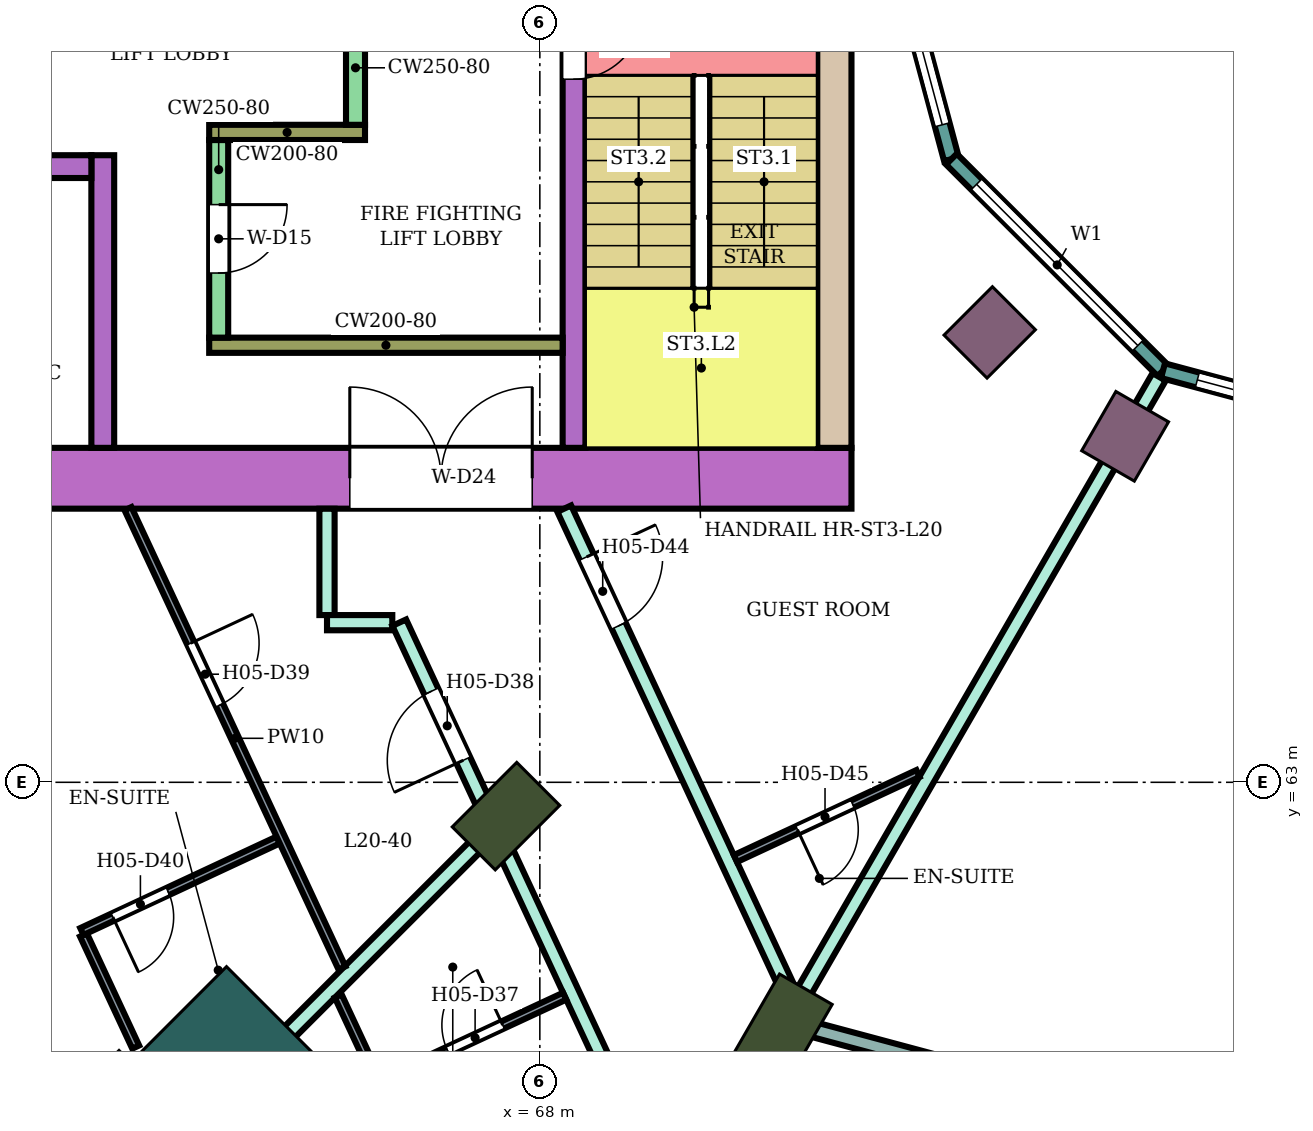
"""IFC4 building model, lengths in metres.
Left out: names, types, materials, properties, quantities, classifications, styles, units other than length and angle.
Written with IfcOpenShell. Run it as: python <this file> out.ifc"""

import sys

from ifc_helpers import new_model, si_unit, direction, frame, frame_2d, origin, origin_2d, place, context, subcontext, project, spatial, rectangle, extrude, element, fill, save


model = new_model("IFC4")
c1 = context("Model", 3, precision=1e-05, world=origin(), true_north=direction((0.0, 1.0)))
c2 = subcontext(c1, "Body", "Model", "MODEL_VIEW")
j1 = project(units=[si_unit("LENGTHUNIT", "METRE"), si_unit("PLANEANGLEUNIT", "RADIAN")], contexts=[c1])
p1 = place(None, origin())
s1 = spatial("IfcSite", under=j1, at=p1, CompositionType="ELEMENT")
p2 = place(p1, origin())
s2 = spatial("IfcBuilding", under=s1, at=p2, CompositionType="ELEMENT")
p3 = place(p2, frame((0.0, 0.0, 90.0)))
s3 = spatial("IfcBuildingStorey", under=s2, at=p3, CompositionType="ELEMENT", Elevation=90.0)
for number, where, z_axis, x_axis in (
    (1, (67.555, 62.555, 0.0), (0.0, 0.0, 1.0), (-0.707, -0.707, 0.0)),
    (2, (71.2, 59.758, 0.0), (0.0, 0.0, 1.0), (-0.5, -0.866, 0.0)),
):
    element("IfcColumn", number, at=place(p3, frame(where, z_axis=z_axis, x_axis=x_axis)), inside=s3, PredefinedType="COLUMN", context=c2, shape_type="SweptSolid", body=[
        extrude(rectangle(XDim=1.2, YDim=0.8, at=origin_2d()), origin(), (0.0, 0.0, 1.0), 3.8),
    ])
for number, where, z_axis, x_axis in (
    (3, (73.919, 68.919, 0.0), (0.0, 0.0, 1.0), (-0.707, -0.707, 0.0)),
    (4, (75.7, 67.552, 0.0), (0.0, 0.0, 1.0), (-0.5, -0.866, 0.0)),
):
    element("IfcColumn", number, at=place(p3, frame(where, z_axis=z_axis, x_axis=x_axis)), inside=s3, PredefinedType="COLUMN", context=c2, shape_type="SweptSolid", body=[
        extrude(rectangle(XDim=0.9, YDim=0.8, at=origin_2d()), origin(), (0.0, 0.0, 1.0), 3.8),
    ])
p4 = place(p3, frame((64.09, 59.09, 0.0), z_axis=(0.0, 0.0, 1.0), x_axis=(-0.707106781187, -0.707106781187, 0.0)))
e5 = element("IfcColumn", 5, at=p4, inside=s3, PredefinedType="COLUMN", context=c2, shape_type="SweptSolid", body=[
    extrude(rectangle(XDim=1.8, YDim=2.4, at=origin_2d()), origin(), (0.0, 0.0, 1.0), 3.8),
])
p5 = place(p3, frame((72.1, 67.0, 0.0), z_axis=(0.0, 0.0, 1.0), x_axis=(-1.0, 0.0, 0.0)))
e6 = element("IfcWall", 6, at=p5, inside=s3, PredefinedType="SHEAR", context=c2, shape_type="SweptSolid", body=[
    extrude(rectangle(XDim=14.7, YDim=0.8, at=frame_2d((7.35, 0.0))), origin(), (0.0, 0.0, 1.0), 3.48),
])
p6 = place(p5, frame((4.2, 0.0, 0.0)))
e7 = element("IfcOpeningElement", 7, at=p6, cuts=e6, PredefinedType="OPENING", context=c2, shape_type="SweptSolid", body=[
    extrude(rectangle(XDim=2.4, YDim=2.4, at=frame_2d((1.2, 1.2))), frame((0.0, 0.41, 0.0), z_axis=(0.0, -1.0, 0.0), x_axis=(1.0, 0.0, 0.0)), (0.0, 0.0, 1.0), 0.82),
])
p7 = place(p3, frame((71.875, 75.0, 0.0), z_axis=(0.0, 0.0, 1.0), x_axis=(0.0, -1.0, 0.0)))
e8 = element("IfcWall", 8, at=p7, inside=s3, PredefinedType="SHEAR", context=c2, shape_type="SweptSolid", body=[
    extrude(rectangle(XDim=7.6, YDim=0.45, at=frame_2d((3.8, 0.0))), origin(), (0.0, 0.0, 1.0), 3.48),
])
p8 = place(p3, frame((68.45, 75.0, 0.0), z_axis=(0.0, 0.0, 1.0), x_axis=(0.0, -1.0, 0.0)))
e9 = element("IfcWall", 9, at=p8, inside=s3, PredefinedType="SHEAR", context=c2, shape_type="SweptSolid", body=[
    extrude(rectangle(XDim=7.6, YDim=0.3, at=frame_2d((3.8, 0.0))), origin(), (0.0, 0.0, 1.0), 3.48),
])
p9 = place(p8, frame((1.85, 0.0, 0.0)))
e10 = element("IfcOpeningElement", 10, at=p9, cuts=e9, PredefinedType="OPENING", context=c2, shape_type="SweptSolid", body=[
    extrude(rectangle(XDim=0.9, YDim=2.1, at=frame_2d((0.45, 1.05))), frame((0.0, 0.16, 0.0), z_axis=(0.0, -1.0, 0.0), x_axis=(1.0, 0.0, 0.0)), (0.0, 0.0, 1.0), 0.32),
])
p10 = place(p3, frame((68.3, 68.75, 0.0), z_axis=(0.0, 0.0, 1.0), x_axis=(-1.0, 0.0, 0.0)))
e11 = element("IfcWall", 11, at=p10, inside=s3, PredefinedType="SHEAR", context=c2, shape_type="SweptSolid", body=[
    extrude(rectangle(XDim=4.65, YDim=0.2, at=frame_2d((2.325, 0.0))), origin(), (0.0, 0.0, 1.0), 3.48),
])
p11 = place(p3, frame((63.775, 71.45, 0.0), z_axis=(0.0, 0.0, 1.0), x_axis=(0.0, -1.0, 0.0)))
e12 = element("IfcWall", 12, at=p11, inside=s3, PredefinedType="SHEAR", context=c2, shape_type="SweptSolid", body=[
    extrude(rectangle(XDim=2.6, YDim=0.25, at=frame_2d((1.3, 0.0))), origin(), (0.0, 0.0, 1.0), 3.48),
])
p12 = place(p11, frame((0.85, 0.0, 0.0)))
e13 = element("IfcOpeningElement", 13, at=p12, cuts=e12, PredefinedType="OPENING", context=c2, shape_type="SweptSolid", body=[
    extrude(rectangle(XDim=0.9, YDim=2.1, at=frame_2d((0.45, 1.05))), frame((0.0, 0.135, 0.0), z_axis=(0.0, -1.0, 0.0), x_axis=(1.0, 0.0, 0.0)), (0.0, 0.0, 1.0), 0.27),
])
p13 = place(p3, frame((65.7, 71.55, 0.0), z_axis=(0.0, 0.0, 1.0), x_axis=(-1.0, 0.0, 0.0)))
e14 = element("IfcWall", 14, at=p13, inside=s3, PredefinedType="SHEAR", context=c2, shape_type="SweptSolid", body=[
    extrude(rectangle(XDim=2.05, YDim=0.2, at=frame_2d((1.025, 0.0))), origin(), (0.0, 0.0, 1.0), 3.48),
])
p14 = place(p3, frame((65.575, 73.15, 0.0), z_axis=(0.0, 0.0, 1.0), x_axis=(0.0, -1.0, 0.0)))
e15 = element("IfcWall", 15, at=p14, inside=s3, PredefinedType="SHEAR", context=c2, shape_type="SweptSolid", body=[
    extrude(rectangle(XDim=1.5, YDim=0.25, at=frame_2d((0.75, 0.0))), origin(), (0.0, 0.0, 1.0), 3.48),
])
p15 = place(p3, frame((62.25, 71.25, 0.0), z_axis=(0.0, 0.0, 1.0), x_axis=(0.0, -1.0, 0.0)))
e16 = element("IfcWall", 16, at=p15, inside=s3, PredefinedType="SHEAR", context=c2, shape_type="SweptSolid", body=[
    extrude(rectangle(XDim=3.85, YDim=0.3, at=frame_2d((1.925, 0.0))), origin(), (0.0, 0.0, 1.0), 3.48),
])
p16 = place(p3, frame((62.1, 71.1, 0.0), z_axis=(0.0, 0.0, 1.0), x_axis=(-1.0, 0.0, 0.0)))
e17 = element("IfcWall", 17, at=p16, inside=s3, PredefinedType="SHEAR", context=c2, shape_type="SweptSolid", body=[
    extrude(rectangle(XDim=4.7, YDim=0.3, at=frame_2d((2.35, 0.0))), origin(), (0.0, 0.0, 1.0), 3.48),
])
p17 = place(p16, frame((0.725, 0.0, 0.0)))
e18 = element("IfcOpeningElement", 18, at=p17, cuts=e17, PredefinedType="OPENING", context=c2, shape_type="SweptSolid", body=[
    extrude(rectangle(XDim=0.9, YDim=2.1, at=frame_2d((0.45, 1.05))), frame((0.0, 0.16, 0.0), z_axis=(0.0, -1.0, 0.0), x_axis=(1.0, 0.0, 0.0)), (0.0, 0.0, 1.0), 0.32),
])
p18 = place(p16, frame((3.075, 0.0, 0.0)))
e19 = element("IfcOpeningElement", 19, at=p18, cuts=e17, PredefinedType="OPENING", context=c2, shape_type="SweptSolid", body=[
    extrude(rectangle(XDim=0.9, YDim=2.1, at=frame_2d((0.45, 1.05))), frame((0.0, 0.16, 0.0), z_axis=(0.0, -1.0, 0.0), x_axis=(1.0, 0.0, 0.0)), (0.0, 0.0, 1.0), 0.32),
])
p19 = place(p3, frame((72.396, 75.0, 0.0), z_axis=(0.0, 0.0, 1.0), x_axis=(0.258789828301, -0.965933654434, 0.0)))
e20 = element("IfcWall", 20, at=p19, inside=s3, PredefinedType="NOTDEFINED", context=c2, shape_type="SweptSolid", body=[
    extrude(rectangle(XDim=3.936, YDim=0.2, at=frame_2d((1.968, 0.0))), origin(), (0.0, 0.0, 1.0), 3.8),
])
p20 = place(p19, frame((0.468, 0.0, 0.9)))
e21 = element("IfcOpeningElement", 21, at=p20, cuts=e20, PredefinedType="OPENING", context=c2, shape_type="SweptSolid", body=[
    extrude(rectangle(XDim=3.0, YDim=2.3, at=frame_2d((1.5, 1.15))), frame((0.0, 0.11, 0.0), z_axis=(0.0, -1.0, 0.0), x_axis=(1.0, 0.0, 0.0)), (0.0, 0.0, 1.0), 0.22),
])
p21 = place(p3, frame((73.415, 71.198, 0.0), z_axis=(0.0, 0.0, 1.0), x_axis=(0.707106781187, -0.707106781187, 0.0)))
e22 = element("IfcWall", 22, at=p21, inside=s3, PredefinedType="NOTDEFINED", context=c2, shape_type="SweptSolid", body=[
    extrude(rectangle(XDim=3.936, YDim=0.2, at=frame_2d((1.968, 0.0))), origin(), (0.0, 0.0, 1.0), 3.8),
])
p22 = place(p21, frame((0.468, 0.0, 0.9)))
e23 = element("IfcOpeningElement", 23, at=p22, cuts=e22, PredefinedType="OPENING", context=c2, shape_type="SweptSolid", body=[
    extrude(rectangle(XDim=3.0, YDim=2.3, at=frame_2d((1.5, 1.15))), frame((0.0, 0.11, 0.0), z_axis=(0.0, -1.0, 0.0), x_axis=(1.0, 0.0, 0.0)), (0.0, 0.0, 1.0), 0.22),
])
p23 = place(p3, frame((76.198, 68.415, 0.0), z_axis=(0.0, 0.0, 1.0), x_axis=(0.965933654434, -0.258789828301, 0.0)))
e24 = element("IfcWall", 24, at=p23, inside=s3, PredefinedType="NOTDEFINED", context=c2, shape_type="SweptSolid", body=[
    extrude(rectangle(XDim=3.936, YDim=0.2, at=frame_2d((1.968, 0.0))), origin(), (0.0, 0.0, 1.0), 3.8),
])
p24 = place(p23, frame((0.468, 0.0, 0.9)))
e25 = element("IfcOpeningElement", 25, at=p24, cuts=e24, PredefinedType="OPENING", context=c2, shape_type="SweptSolid", body=[
    extrude(rectangle(XDim=3.0, YDim=2.3, at=frame_2d((1.5, 1.15))), frame((0.0, 0.11, 0.0), z_axis=(0.0, -1.0, 0.0), x_axis=(1.0, 0.0, 0.0)), (0.0, 0.0, 1.0), 0.22),
])
p25 = place(p3, frame((63.593, 58.599, 0.0), z_axis=(0.0, 0.0, 1.0), x_axis=(0.707292874152, 0.706920639233, 0.0)))
e26 = element("IfcWall", 26, at=p25, inside=s3, PredefinedType="PARTITIONING", context=c2, shape_type="SweptSolid", body=[
    extrude(rectangle(XDim=5.247, YDim=0.2, at=frame_2d((2.624, 0.0))), origin(), (0.0, 0.0, 1.0), 3.35),
])
p26 = place(p3, frame((65.2, 65.2, 0.0), z_axis=(0.0, 0.0, 1.0), x_axis=(0.0, 1.0, 0.0)))
e27 = element("IfcWall", 27, at=p26, inside=s3, PredefinedType="PARTITIONING", context=c2, shape_type="SweptSolid", body=[
    extrude(rectangle(XDim=1.399, YDim=0.2, at=frame_2d((0.7, 0.0))), origin(), (0.0, 0.0, 1.0), 3.35),
])
p27 = place(p3, frame((65.2, 65.1, 0.0), z_axis=(0.0, 0.0, 1.0), x_axis=(1.0, 0.0, 0.0)))
e28 = element("IfcWall", 28, at=p27, inside=s3, PredefinedType="PARTITIONING", context=c2, shape_type="SweptSolid", body=[
    extrude(rectangle(XDim=0.859, YDim=0.2, at=frame_2d((0.43, 0.0))), origin(), (0.0, 0.0, 1.0), 3.35),
])
p28 = place(p3, frame((66.15, 65.1, 0.0), z_axis=(0.0, 0.0, 1.0), x_axis=(0.421874842351, -0.906654078131, 0.0)))
e29 = element("IfcWall", 29, at=p28, inside=s3, PredefinedType="PARTITIONING", context=c2, shape_type="SweptSolid", body=[
    extrude(rectangle(XDim=8.228, YDim=0.2, at=frame_2d((4.114, 0.0))), origin(), (0.0, 0.0, 1.0), 3.35),
])
p29 = place(p28, frame((6.748, 0.0, 0.0)))
e30 = element("IfcOpeningElement", 30, at=p29, cuts=e29, PredefinedType="OPENING", context=c2, shape_type="SweptSolid", body=[
    extrude(rectangle(XDim=1.0, YDim=2.1, at=frame_2d((0.5, 1.05))), frame((0.0, 0.11, 0.0), z_axis=(0.0, -1.0, 0.0), x_axis=(1.0, 0.0, 0.0)), (0.0, 0.0, 1.0), 0.22),
])
p30 = place(p28, frame((0.997, 0.0, 0.0)))
e31 = element("IfcOpeningElement", 31, at=p30, cuts=e29, PredefinedType="OPENING", context=c2, shape_type="SweptSolid", body=[
    extrude(rectangle(XDim=1.0, YDim=2.1, at=frame_2d((0.5, 1.05))), frame((0.0, 0.11, 0.0), z_axis=(0.0, -1.0, 0.0), x_axis=(1.0, 0.0, 0.0)), (0.0, 0.0, 1.0), 0.22),
])
p31 = place(p3, frame((68.321, 66.6, 0.0), z_axis=(0.0, 0.0, 1.0), x_axis=(0.421914092414, -0.906635813666, 0.0)))
e32 = element("IfcWall", 32, at=p31, inside=s3, PredefinedType="PARTITIONING", context=c2, shape_type="SweptSolid", body=[
    extrude(rectangle(XDim=7.459, YDim=0.2, at=frame_2d((3.73, 0.0))), origin(), (0.0, 0.0, 1.0), 3.35),
])
p32 = place(p31, frame((0.7, 0.0, 0.0)))
e33 = element("IfcOpeningElement", 33, at=p32, cuts=e32, PredefinedType="OPENING", context=c2, shape_type="SweptSolid", body=[
    extrude(rectangle(XDim=1.0, YDim=2.1, at=frame_2d((0.5, 1.05))), frame((0.0, 0.11, 0.0), z_axis=(0.0, -1.0, 0.0), x_axis=(1.0, 0.0, 0.0)), (0.0, 0.0, 1.0), 0.22),
])
p33 = place(p3, frame((71.459, 60.218, 0.0), z_axis=(0.0, 0.0, 1.0), x_axis=(0.500232027118, 0.865891401416, 0.0)))
e34 = element("IfcWall", 34, at=p33, inside=s3, PredefinedType="PARTITIONING", context=c2, shape_type="SweptSolid", body=[
    extrude(rectangle(XDim=9.372, YDim=0.2, at=frame_2d((4.686, 0.0))), origin(), (0.0, 0.0, 1.0), 3.35),
])
p34 = place(p3, frame((71.498, 59.774, 0.0), z_axis=(0.0, 0.0, 1.0), x_axis=(0.965911938046, -0.258870871168, 0.0)))
e35 = element("IfcWall", 35, at=p34, inside=s3, PredefinedType="PARTITIONING", context=c2, shape_type="SweptSolid", body=[
    extrude(rectangle(XDim=8.752, YDim=0.2, at=frame_2d((4.376, 0.0))), origin(), (0.0, 0.0, 1.0), 2.98),
])
p35 = place(p34, frame((4.701, 0.0, 0.0)))
e36 = element("IfcOpeningElement", 36, at=p35, cuts=e35, PredefinedType="OPENING", context=c2, shape_type="SweptSolid", body=[
    extrude(rectangle(XDim=1.8, YDim=2.1, at=frame_2d((0.9, 1.05))), frame((0.0, 0.11, 0.0), z_axis=(0.0, -1.0, 0.0), x_axis=(1.0, 0.0, 0.0)), (0.0, 0.0, 1.0), 0.22),
])
p36 = place(p3, frame((61.996, 60.992, 0.0), z_axis=(0.0, 0.0, 1.0), x_axis=(0.422318684634, -0.906447421867, 0.0)))
e37 = element("IfcWall", 37, at=p36, inside=s3, PredefinedType="PARTITIONING", context=c2, shape_type="SweptSolid", body=[
    extrude(rectangle(XDim=1.627, YDim=0.1, at=frame_2d((0.814, 0.0))), origin(), (0.0, 0.0, 1.0), 3.35),
])
p37 = place(p3, frame((61.975, 61.037, 0.0), z_axis=(0.0, 0.0, 1.0), x_axis=(0.906360368959, 0.422505481125, 0.0)))
e38 = element("IfcWall", 38, at=p37, inside=s3, PredefinedType="PARTITIONING", context=c2, shape_type="SweptSolid", body=[
    extrude(rectangle(XDim=2.849, YDim=0.1, at=frame_2d((1.425, 0.0))), origin(), (0.0, 0.0, 1.0), 3.35),
])
p38 = place(p37, frame((0.45, 0.0, 0.0)))
e39 = element("IfcOpeningElement", 39, at=p38, cuts=e38, PredefinedType="OPENING", context=c2, shape_type="SweptSolid", body=[
    extrude(rectangle(XDim=0.8, YDim=2.1, at=frame_2d((0.4, 1.05))), frame((0.0, 0.06, 0.0), z_axis=(0.0, -1.0, 0.0), x_axis=(1.0, 0.0, 0.0)), (0.0, 0.0, 1.0), 0.12),
])
p39 = place(p3, frame((62.582, 66.6, 0.0), z_axis=(0.0, 0.0, 1.0), x_axis=(0.422283870085, -0.906463641337, 0.0)))
e40 = element("IfcWall", 40, at=p39, inside=s3, PredefinedType="PARTITIONING", context=c2, shape_type="SweptSolid", body=[
    extrude(rectangle(XDim=6.666, YDim=0.1, at=frame_2d((3.333, 0.0))), origin(), (0.0, 0.0, 1.0), 3.35),
])
p40 = place(p39, frame((1.953, 0.0, 0.0)))
e41 = element("IfcOpeningElement", 41, at=p40, cuts=e40, PredefinedType="OPENING", context=c2, shape_type="SweptSolid", body=[
    extrude(rectangle(XDim=0.9, YDim=2.1, at=frame_2d((0.45, 1.05))), frame((0.0, 0.06, 0.0), z_axis=(0.0, -1.0, 0.0), x_axis=(1.0, 0.0, 0.0)), (0.0, 0.0, 1.0), 0.12),
])
p41 = place(p3, frame((65.348, 60.188, 0.0), z_axis=(0.0, 0.0, 1.0), x_axis=(0.422387529151, -0.906415343657, 0.0)))
e42 = element("IfcWall", 42, at=p41, inside=s3, PredefinedType="PARTITIONING", context=c2, shape_type="SweptSolid", body=[
    extrude(rectangle(XDim=1.208, YDim=0.1, at=frame_2d((0.604, 0.0))), origin(), (0.0, 0.0, 1.0), 3.35),
])
p42 = place(p3, frame((65.879, 59.048, 0.0), z_axis=(0.0, 0.0, 1.0), x_axis=(0.906746039995, 0.421677150144, 0.0)))
e43 = element("IfcWall", 43, at=p42, inside=s3, PredefinedType="PARTITIONING", context=c2, shape_type="SweptSolid", body=[
    extrude(rectangle(XDim=2.7, YDim=0.1, at=frame_2d((1.35, 0.0))), origin(), (0.0, 0.0, 1.0), 3.35),
])
p43 = place(p42, frame((1.0, 0.0, 0.0)))
e44 = element("IfcOpeningElement", 44, at=p43, cuts=e43, PredefinedType="OPENING", context=c2, shape_type="SweptSolid", body=[
    extrude(rectangle(XDim=0.8, YDim=2.1, at=frame_2d((0.4, 1.05))), frame((0.0, 0.06, 0.0), z_axis=(0.0, -1.0, 0.0), x_axis=(1.0, 0.0, 0.0)), (0.0, 0.0, 1.0), 0.12),
])
p44 = place(p3, frame((70.574, 61.997, 0.0), z_axis=(0.0, 0.0, 1.0), x_axis=(0.906503026865, 0.422199315826, 0.0)))
e45 = element("IfcWall", 45, at=p44, inside=s3, PredefinedType="PARTITIONING", context=c2, shape_type="SweptSolid", body=[
    extrude(rectangle(XDim=2.65, YDim=0.1, at=frame_2d((1.325, 0.0))), origin(), (0.0, 0.0, 1.0), 3.35),
])
p45 = place(p44, frame((0.9, 0.0, 0.0)))
e46 = element("IfcOpeningElement", 46, at=p45, cuts=e45, PredefinedType="OPENING", context=c2, shape_type="SweptSolid", body=[
    extrude(rectangle(XDim=0.8, YDim=2.1, at=frame_2d((0.4, 1.05))), frame((0.0, 0.06, 0.0), z_axis=(0.0, -1.0, 0.0), x_axis=(1.0, 0.0, 0.0)), (0.0, 0.0, 1.0), 0.12),
])
p46 = place(p20, origin())
e47 = element("IfcWindow", 47, at=p46, inside=s3, PartitioningType="SINGLE_PANEL", PredefinedType="WINDOW", context=c2, shape_type="SweptSolid", body=[
    extrude(rectangle(XDim=3.0, YDim=2.3, at=frame_2d((1.5, 1.15))), frame((0.0, 0.03, 0.0), z_axis=(0.0, -1.0, 0.0), x_axis=(1.0, 0.0, 0.0)), (0.0, 0.0, 1.0), 0.06),
])
fill(e21, e47)
p47 = place(p22, origin())
e48 = element("IfcWindow", 48, at=p47, inside=s3, PartitioningType="SINGLE_PANEL", PredefinedType="WINDOW", context=c2, shape_type="SweptSolid", body=[
    extrude(rectangle(XDim=3.0, YDim=2.3, at=frame_2d((1.5, 1.15))), frame((0.0, 0.03, 0.0), z_axis=(0.0, -1.0, 0.0), x_axis=(1.0, 0.0, 0.0)), (0.0, 0.0, 1.0), 0.06),
])
fill(e23, e48)
p48 = place(p24, origin())
e49 = element("IfcWindow", 49, at=p48, inside=s3, PartitioningType="SINGLE_PANEL", PredefinedType="WINDOW", context=c2, shape_type="SweptSolid", body=[
    extrude(rectangle(XDim=3.0, YDim=2.3, at=frame_2d((1.5, 1.15))), frame((0.0, 0.03, 0.0), z_axis=(0.0, -1.0, 0.0), x_axis=(1.0, 0.0, 0.0)), (0.0, 0.0, 1.0), 0.06),
])
fill(e25, e49)
p49 = place(p43, origin())
e50 = element("IfcDoor", 50, at=p49, inside=s3, OperationType="SINGLE_SWING_RIGHT", PredefinedType="DOOR", context=c2, shape_type="SweptSolid", body=[
    extrude(rectangle(XDim=0.8, YDim=2.1, at=frame_2d((0.4, 1.05))), frame((0.0, 0.025, 0.0), z_axis=(0.0, -1.0, 0.0), x_axis=(1.0, 0.0, 0.0)), (0.0, 0.0, 1.0), 0.05),
])
fill(e44, e50)
p50 = place(p30, frame((1.0, 0.0, 0.0), z_axis=(0.0, 0.0, 1.0), x_axis=(-1.0, 0.0, 0.0)))
e51 = element("IfcDoor", 51, at=p50, inside=s3, OperationType="SINGLE_SWING_LEFT", PredefinedType="DOOR", context=c2, shape_type="SweptSolid", body=[
    extrude(rectangle(XDim=1.0, YDim=2.1, at=frame_2d((0.5, 1.05))), frame((0.0, 0.025, 0.0), z_axis=(0.0, -1.0, 0.0), x_axis=(1.0, 0.0, 0.0)), (0.0, 0.0, 1.0), 0.05),
])
fill(e31, e51)
p51 = place(p40, origin())
e52 = element("IfcDoor", 52, at=p51, inside=s3, OperationType="SINGLE_SWING_LEFT", PredefinedType="DOOR", context=c2, shape_type="SweptSolid", body=[
    extrude(rectangle(XDim=0.9, YDim=2.1, at=frame_2d((0.45, 1.05))), frame((0.0, 0.025, 0.0), z_axis=(0.0, -1.0, 0.0), x_axis=(1.0, 0.0, 0.0)), (0.0, 0.0, 1.0), 0.05),
])
fill(e41, e52)
p52 = place(p38, frame((0.8, 0.0, 0.0), z_axis=(0.0, 0.0, 1.0), x_axis=(-1.0, 0.0, 0.0)))
e53 = element("IfcDoor", 53, at=p52, inside=s3, OperationType="SINGLE_SWING_RIGHT", PredefinedType="DOOR", context=c2, shape_type="SweptSolid", body=[
    extrude(rectangle(XDim=0.8, YDim=2.1, at=frame_2d((0.4, 1.05))), frame((0.0, 0.025, 0.0), z_axis=(0.0, -1.0, 0.0), x_axis=(1.0, 0.0, 0.0)), (0.0, 0.0, 1.0), 0.05),
])
fill(e39, e53)
p53 = place(p32, origin())
e54 = element("IfcDoor", 54, at=p53, inside=s3, OperationType="SINGLE_SWING_LEFT", PredefinedType="DOOR", context=c2, shape_type="SweptSolid", body=[
    extrude(rectangle(XDim=1.0, YDim=2.1, at=frame_2d((0.5, 1.05))), frame((0.0, 0.025, 0.0), z_axis=(0.0, -1.0, 0.0), x_axis=(1.0, 0.0, 0.0)), (0.0, 0.0, 1.0), 0.05),
])
fill(e33, e54)
p54 = place(p45, frame((0.8, 0.0, 0.0), z_axis=(0.0, 0.0, 1.0), x_axis=(-1.0, 0.0, 0.0)))
e55 = element("IfcDoor", 55, at=p54, inside=s3, OperationType="SINGLE_SWING_RIGHT", PredefinedType="DOOR", context=c2, shape_type="SweptSolid", body=[
    extrude(rectangle(XDim=0.8, YDim=2.1, at=frame_2d((0.4, 1.05))), frame((0.0, 0.025, 0.0), z_axis=(0.0, -1.0, 0.0), x_axis=(1.0, 0.0, 0.0)), (0.0, 0.0, 1.0), 0.05),
])
fill(e46, e55)
p55 = place(p9, origin())
e56 = element("IfcDoor", 56, at=p55, inside=s3, OperationType="SINGLE_SWING_LEFT", PredefinedType="DOOR", context=c2, shape_type="SweptSolid", body=[
    extrude(rectangle(XDim=0.9, YDim=2.1, at=frame_2d((0.45, 1.05))), frame((0.0, 0.025, 0.0), z_axis=(0.0, -1.0, 0.0), x_axis=(1.0, 0.0, 0.0)), (0.0, 0.0, 1.0), 0.05),
])
fill(e10, e56)
p56 = place(p12, origin())
e57 = element("IfcDoor", 57, at=p56, inside=s3, OperationType="SINGLE_SWING_LEFT", PredefinedType="DOOR", context=c2, shape_type="SweptSolid", body=[
    extrude(rectangle(XDim=0.9, YDim=2.1, at=frame_2d((0.45, 1.05))), frame((0.0, 0.025, 0.0), z_axis=(0.0, -1.0, 0.0), x_axis=(1.0, 0.0, 0.0)), (0.0, 0.0, 1.0), 0.05),
])
fill(e13, e57)
p57 = place(p6, frame((2.4, 0.0, 0.0), z_axis=(0.0, 0.0, 1.0), x_axis=(-1.0, 0.0, 0.0)))
e58 = element("IfcDoor", 58, at=p57, inside=s3, OperationType="DOUBLE_DOOR_SINGLE_SWING", PredefinedType="DOOR", context=c2, shape_type="SweptSolid", body=[
    extrude(rectangle(XDim=2.4, YDim=2.4, at=frame_2d((1.2, 1.2))), frame((0.0, 0.025, 0.0), z_axis=(0.0, -1.0, 0.0), x_axis=(1.0, 0.0, 0.0)), (0.0, 0.0, 1.0), 0.05),
])
fill(e7, e58)
save(model, sys.argv[1])
